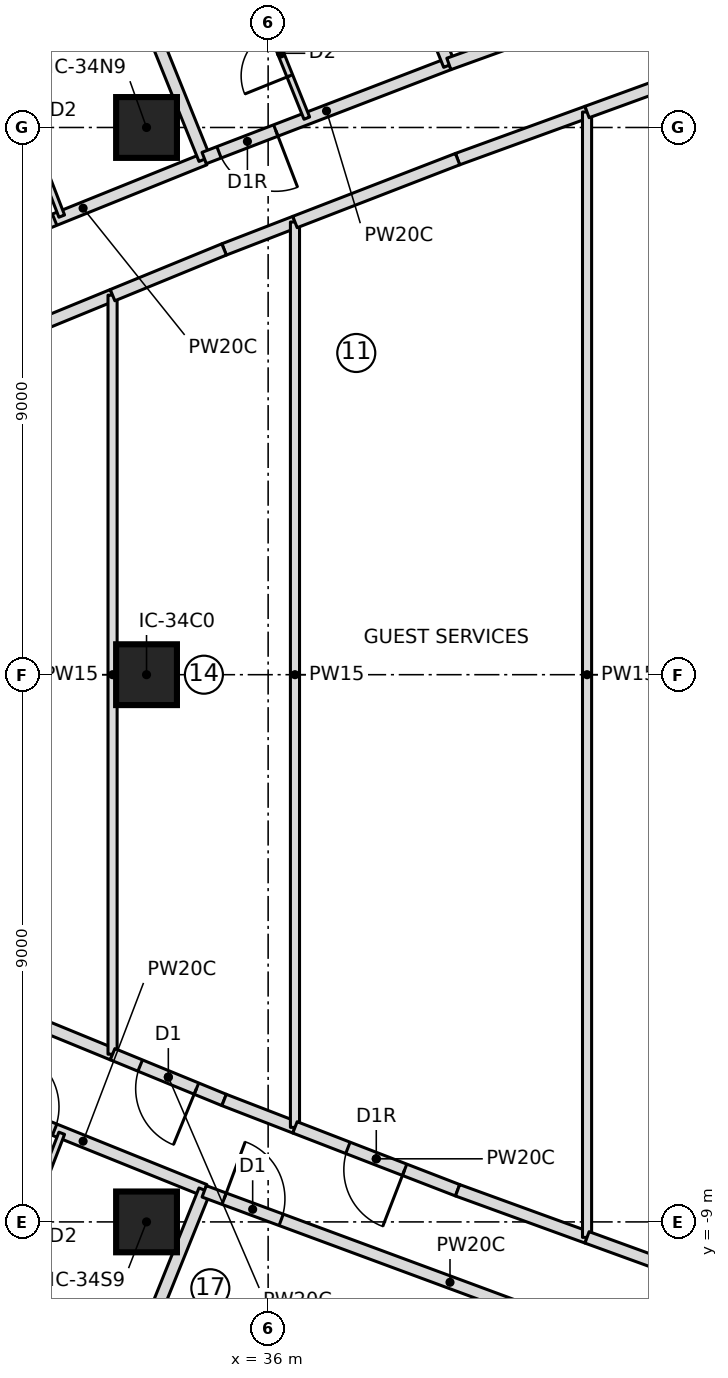
"""IFC4 building model, lengths in metres.
Left out: names, types, materials, properties, quantities, classifications, styles, units other than length and angle.
Written with IfcOpenShell. Run it as: python <this file> out.ifc"""

import sys

from ifc_helpers import new_model, si_unit, direction, frame, frame_2d, origin, origin_2d, place, context, subcontext, project, spatial, rectangle, extrude, element, fill, save


model = new_model("IFC4")
c1 = context("Model", 3, precision=1e-05, world=origin(), true_north=direction((0.0, 1.0)))
c2 = subcontext(c1, "Body", "Model", "MODEL_VIEW")
j1 = project(units=[si_unit("LENGTHUNIT", "METRE"), si_unit("PLANEANGLEUNIT", "RADIAN")], contexts=[c1])
p1 = place(None, origin())
s1 = spatial("IfcSite", under=j1, at=p1, CompositionType="ELEMENT")
p2 = place(p1, origin())
s2 = spatial("IfcBuilding", under=s1, at=p2, CompositionType="ELEMENT")
p3 = place(p2, frame((0.0, 0.0, 203.9)))
s3 = spatial("IfcBuildingStorey", under=s2, at=p3, CompositionType="ELEMENT", Elevation=203.9)
for number, where, z_axis, x_axis in (
    (1, (34.0, -9.0, 0.0), (0.0, 0.0, 1.0), (1.0, 0.0, 0.0)),
    (2, (34.0, 0.0, 0.0), (0.0, 0.0, 1.0), (1.0, 0.0, 0.0)),
    (3, (34.0, 9.0, 0.0), (0.0, 0.0, 1.0), (1.0, 0.0, 0.0)),
):
    element("IfcColumn", number, at=place(p3, frame(where, z_axis=z_axis, x_axis=x_axis)), inside=s3, PredefinedType="COLUMN", context=c2, shape_type="SweptSolid", body=[
        extrude(rectangle(XDim=1.0, YDim=1.0, at=origin_2d()), origin(), (0.0, 0.0, 1.0), 3.55),
    ])
p4 = place(p3, frame((30.958, 6.866, 0.0), z_axis=(0.0, 0.0, 1.0), x_axis=(0.927398695046, 0.374074404933, 0.0)))
e4 = element("IfcWall", 4, at=p4, inside=s3, PredefinedType="PARTITIONING", context=c2, shape_type="SweptSolid", body=[
    extrude(rectangle(XDim=4.311, YDim=0.2, at=frame_2d((2.155, 0.0))), origin(), (0.0, 0.0, 1.0), 3.25),
])
p5 = place(p4, frame((0.65, 0.0, 0.0)))
e5 = element("IfcOpeningElement", 5, at=p5, cuts=e4, PredefinedType="OPENING", context=c2, shape_type="SweptSolid", body=[
    extrude(rectangle(XDim=1.0, YDim=2.1, at=frame_2d((0.5, 1.05))), frame((0.0, 0.11, 0.0), z_axis=(0.0, -1.0, 0.0), x_axis=(1.0, 0.0, 0.0)), (0.0, 0.0, 1.0), 0.22),
])
p6 = place(p3, frame((32.605, 7.542, 0.0), z_axis=(0.0, 0.0, 1.0), x_axis=(-0.359637744424, 0.933092006603, 0.0)))
e6 = element("IfcWall", 6, at=p6, inside=s3, PredefinedType="PARTITIONING", context=c2, shape_type="SweptSolid", body=[
    extrude(rectangle(XDim=2.98, YDim=0.1, at=frame_2d((1.49, 0.0))), origin(), (0.0, 0.0, 1.0), 3.25),
])
p7 = place(p6, frame((1.45, 0.0, 0.0)))
e7 = element("IfcOpeningElement", 7, at=p7, cuts=e6, PredefinedType="OPENING", context=c2, shape_type="SweptSolid", body=[
    extrude(rectangle(XDim=0.8, YDim=2.1, at=frame_2d((0.4, 1.05))), frame((0.0, 0.06, 0.0), z_axis=(0.0, -1.0, 0.0), x_axis=(1.0, 0.0, 0.0)), (0.0, 0.0, 1.0), 0.12),
])
p8 = place(p3, frame((34.956, 8.479, 0.0), z_axis=(0.0, 0.0, 1.0), x_axis=(-0.373881438439, 0.927476506436, 0.0)))
e8 = element("IfcWall", 8, at=p8, inside=s3, PredefinedType="PARTITIONING", context=c2, shape_type="SweptSolid", body=[
    extrude(rectangle(XDim=7.601, YDim=0.2, at=frame_2d((3.8, 0.0))), origin(), (0.0, 0.0, 1.0), 3.25),
])
p9 = place(p3, frame((38.972, 10.045, 0.0), z_axis=(0.0, 0.0, 1.0), x_axis=(-0.93335728106, -0.358948723208, 0.0)))
e9 = element("IfcWall", 9, at=p9, inside=s3, PredefinedType="PARTITIONING", context=c2, shape_type="SweptSolid", body=[
    extrude(rectangle(XDim=4.312, YDim=0.2, at=frame_2d((2.156, 0.0))), origin(), (0.0, 0.0, 1.0), 3.25),
])
p10 = place(p9, frame((3.05, 0.0, 0.0)))
e10 = element("IfcOpeningElement", 10, at=p10, cuts=e9, PredefinedType="OPENING", context=c2, shape_type="SweptSolid", body=[
    extrude(rectangle(XDim=1.0, YDim=2.1, at=frame_2d((0.5, 1.05))), frame((0.0, 0.11, 0.0), z_axis=(0.0, -1.0, 0.0), x_axis=(1.0, 0.0, 0.0)), (0.0, 0.0, 1.0), 0.22),
])
p11 = place(p3, frame((36.636, 9.154, 0.0), z_axis=(0.0, 0.0, 1.0), x_axis=(-0.373885031976, 0.927475057813, 0.0)))
e11 = element("IfcWall", 11, at=p11, inside=s3, PredefinedType="PARTITIONING", context=c2, shape_type="SweptSolid", body=[
    extrude(rectangle(XDim=2.277, YDim=0.1, at=frame_2d((1.138, 0.0))), origin(), (0.0, 0.0, 1.0), 3.25),
])
p12 = place(p11, frame((0.75, 0.0, 0.0)))
e12 = element("IfcOpeningElement", 12, at=p12, cuts=e11, PredefinedType="OPENING", context=c2, shape_type="SweptSolid", body=[
    extrude(rectangle(XDim=0.8, YDim=2.1, at=frame_2d((0.4, 1.05))), frame((0.0, 0.06, 0.0), z_axis=(0.0, -1.0, 0.0), x_axis=(1.0, 0.0, 0.0)), (0.0, 0.0, 1.0), 0.12),
])
p13 = place(p3, frame((38.98, 10.026, 0.0), z_axis=(0.0, 0.0, 1.0), x_axis=(-0.373863662938, 0.927483671843, 0.0)))
e13 = element("IfcWall", 13, at=p13, inside=s3, PredefinedType="PARTITIONING", context=c2, shape_type="SweptSolid", body=[
    extrude(rectangle(XDim=7.604, YDim=0.2, at=frame_2d((3.802, 0.0))), origin(), (0.0, 0.0, 1.0), 3.25),
])
p14 = place(p3, frame((43.026, 11.507, 0.0), z_axis=(0.0, 0.0, 1.0), x_axis=(-0.940653905433, -0.339367397069, 0.0)))
e14 = element("IfcWall", 14, at=p14, inside=s3, PredefinedType="PARTITIONING", context=c2, shape_type="SweptSolid", body=[
    extrude(rectangle(XDim=4.309, YDim=0.2, at=frame_2d((2.155, 0.0))), origin(), (0.0, 0.0, 1.0), 3.25),
])
p15 = place(p14, frame((0.4, 0.0, 0.0)))
e15 = element("IfcOpeningElement", 15, at=p15, cuts=e14, PredefinedType="OPENING", context=c2, shape_type="SweptSolid", body=[
    extrude(rectangle(XDim=1.0, YDim=2.1, at=frame_2d((0.5, 1.05))), frame((0.0, 0.11, 0.0), z_axis=(0.0, -1.0, 0.0), x_axis=(1.0, 0.0, 0.0)), (0.0, 0.0, 1.0), 0.22),
])
p16 = place(p3, frame((30.958, -6.866, 0.0), z_axis=(0.0, 0.0, 1.0), x_axis=(0.927398695046, -0.374074404933, 0.0)))
e16 = element("IfcWall", 16, at=p16, inside=s3, PredefinedType="PARTITIONING", context=c2, shape_type="SweptSolid", body=[
    extrude(rectangle(XDim=4.311, YDim=0.2, at=frame_2d((2.155, 0.0))), origin(), (0.0, 0.0, 1.0), 3.25),
])
p17 = place(p16, frame((0.65, 0.0, 0.0)))
e17 = element("IfcOpeningElement", 17, at=p17, cuts=e16, PredefinedType="OPENING", context=c2, shape_type="SweptSolid", body=[
    extrude(rectangle(XDim=1.0, YDim=2.1, at=frame_2d((0.5, 1.05))), frame((0.0, 0.11, 0.0), z_axis=(0.0, -1.0, 0.0), x_axis=(1.0, 0.0, 0.0)), (0.0, 0.0, 1.0), 0.22),
])
p18 = place(p3, frame((31.534, -10.323, 0.0), z_axis=(0.0, 0.0, 1.0), x_axis=(0.359610255373, 0.933102601127, 0.0)))
e18 = element("IfcWall", 18, at=p18, inside=s3, PredefinedType="PARTITIONING", context=c2, shape_type="SweptSolid", body=[
    extrude(rectangle(XDim=2.98, YDim=0.1, at=frame_2d((1.49, 0.0))), origin(), (0.0, 0.0, 1.0), 3.25),
])
p19 = place(p18, frame((0.75, 0.0, 0.0)))
e19 = element("IfcOpeningElement", 19, at=p19, cuts=e18, PredefinedType="OPENING", context=c2, shape_type="SweptSolid", body=[
    extrude(rectangle(XDim=0.8, YDim=2.1, at=frame_2d((0.4, 1.05))), frame((0.0, 0.06, 0.0), z_axis=(0.0, -1.0, 0.0), x_axis=(1.0, 0.0, 0.0)), (0.0, 0.0, 1.0), 0.12),
])
p20 = place(p3, frame((32.114, -15.528, 0.0), z_axis=(0.0, 0.0, 1.0), x_axis=(0.373881438439, 0.927476506436, 0.0)))
e20 = element("IfcWall", 20, at=p20, inside=s3, PredefinedType="PARTITIONING", context=c2, shape_type="SweptSolid", body=[
    extrude(rectangle(XDim=7.601, YDim=0.2, at=frame_2d((3.8, 0.0))), origin(), (0.0, 0.0, 1.0), 3.25),
])
p21 = place(p3, frame((34.948, -8.497, 0.0), z_axis=(0.0, 0.0, 1.0), x_axis=(0.937864515454, -0.347001657996, 0.0)))
e21 = element("IfcWall", 21, at=p21, inside=s3, PredefinedType="PARTITIONING", context=c2, shape_type="SweptSolid", body=[
    extrude(rectangle(XDim=8.621, YDim=0.2, at=frame_2d((4.311, 0.0))), origin(), (0.0, 0.0, 1.0), 3.25),
])
p22 = place(p21, frame((0.35, 0.0, 0.0)))
e22 = element("IfcOpeningElement", 22, at=p22, cuts=e21, PredefinedType="OPENING", context=c2, shape_type="SweptSolid", body=[
    extrude(rectangle(XDim=1.0, YDim=2.1, at=frame_2d((0.5, 1.05))), frame((0.0, 0.11, 0.0), z_axis=(0.0, -1.0, 0.0), x_axis=(1.0, 0.0, 0.0)), (0.0, 0.0, 1.0), 0.22),
])
for number, where, z_axis, x_axis in (
    (23, (33.441, -6.242, 0.0), (0.0, 0.0, 1.0), (-0.925, 0.379, 0.0)),
    (24, (31.467, 5.432, 0.0), (0.0, 0.0, 1.0), (0.925, 0.379, 0.0)),
):
    element("IfcWall", number, at=place(p3, frame(where, z_axis=z_axis, x_axis=x_axis)), inside=s3, PredefinedType="PARTITIONING", context=c2, shape_type="SweptSolid", body=[
        extrude(rectangle(XDim=2.135, YDim=0.2, at=frame_2d((1.067, 0.0))), origin(), (0.0, 0.0, 1.0), 3.25),
    ])
p23 = place(p3, frame((33.441, -6.242, 0.0), z_axis=(0.0, 0.0, 1.0), x_axis=(0.0, 1.0, 0.0)))
e25 = element("IfcWall", 25, at=p23, inside=s3, PredefinedType="PARTITIONING", context=c2, shape_type="SweptSolid", body=[
    extrude(rectangle(XDim=12.484, YDim=0.15, at=frame_2d((6.242, 0.0))), origin(), (0.0, 0.0, 1.0), 3.25),
])
p24 = place(p3, frame((35.276, -6.994, 0.0), z_axis=(0.0, 0.0, 1.0), x_axis=(-0.925179705777, 0.379529329589, 0.0)))
e26 = element("IfcWall", 26, at=p24, inside=s3, PredefinedType="PARTITIONING", context=c2, shape_type="SweptSolid", body=[
    extrude(rectangle(XDim=1.983, YDim=0.2, at=frame_2d((0.991, 0.0))), origin(), (0.0, 0.0, 1.0), 3.25),
])
p25 = place(p24, frame((0.491, 0.0, 0.0)))
e27 = element("IfcOpeningElement", 27, at=p25, cuts=e26, PredefinedType="OPENING", context=c2, shape_type="SweptSolid", body=[
    extrude(rectangle(XDim=1.0, YDim=2.1, at=frame_2d((0.5, 1.05))), frame((0.0, 0.11, 0.0), z_axis=(0.0, -1.0, 0.0), x_axis=(1.0, 0.0, 0.0)), (0.0, 0.0, 1.0), 0.22),
])
for number, where, z_axis, x_axis in (
    (28, (35.276, 6.994, 0.0), (0.0, 0.0, 1.0), (0.933, 0.361, 0.0)),
    (29, (36.441, -7.445, 0.0), (0.0, 0.0, 1.0), (-0.933, 0.361, 0.0)),
):
    element("IfcWall", number, at=place(p3, frame(where, z_axis=z_axis, x_axis=x_axis)), inside=s3, PredefinedType="PARTITIONING", context=c2, shape_type="SweptSolid", body=[
        extrude(rectangle(XDim=1.25, YDim=0.2, at=frame_2d((0.625, 0.0))), origin(), (0.0, 0.0, 1.0), 3.25),
    ])
p26 = place(p3, frame((33.441, 6.242, 0.0), z_axis=(0.0, 0.0, 1.0), x_axis=(0.925179705777, 0.379529329589, 0.0)))
e30 = element("IfcWall", 30, at=p26, inside=s3, PredefinedType="PARTITIONING", context=c2, shape_type="SweptSolid", body=[
    extrude(rectangle(XDim=1.983, YDim=0.2, at=frame_2d((0.991, 0.0))), origin(), (0.0, 0.0, 1.0), 3.25),
])
p27 = place(p3, frame((36.441, -7.445, 0.0), z_axis=(0.0, 0.0, 1.0), x_axis=(0.0, 1.0, 0.0)))
e31 = element("IfcWall", 31, at=p27, inside=s3, PredefinedType="PARTITIONING", context=c2, shape_type="SweptSolid", body=[
    extrude(rectangle(XDim=14.89, YDim=0.15, at=frame_2d((7.445, 0.0))), origin(), (0.0, 0.0, 1.0), 3.25),
])
p28 = place(p3, frame((39.115, -8.479, 0.0), z_axis=(0.0, 0.0, 1.0), x_axis=(-0.932650373077, 0.36078148733, 0.0)))
e32 = element("IfcWall", 32, at=p28, inside=s3, PredefinedType="PARTITIONING", context=c2, shape_type="SweptSolid", body=[
    extrude(rectangle(XDim=2.867, YDim=0.2, at=frame_2d((1.434, 0.0))), origin(), (0.0, 0.0, 1.0), 3.25),
])
p29 = place(p28, frame((0.934, 0.0, 0.0)))
e33 = element("IfcOpeningElement", 33, at=p29, cuts=e32, PredefinedType="OPENING", context=c2, shape_type="SweptSolid", body=[
    extrude(rectangle(XDim=1.0, YDim=2.1, at=frame_2d((0.5, 1.05))), frame((0.0, 0.11, 0.0), z_axis=(0.0, -1.0, 0.0), x_axis=(1.0, 0.0, 0.0)), (0.0, 0.0, 1.0), 0.22),
])
for number, where, z_axis, x_axis in (
    (34, (39.115, 8.479, 0.0), (0.0, 0.0, 1.0), (0.94, 0.342, 0.0)),
    (35, (41.245, -9.254, 0.0), (0.0, 0.0, 1.0), (-0.94, 0.342, 0.0)),
):
    element("IfcWall", number, at=place(p3, frame(where, z_axis=z_axis, x_axis=x_axis)), inside=s3, PredefinedType="PARTITIONING", context=c2, shape_type="SweptSolid", body=[
        extrude(rectangle(XDim=2.266, YDim=0.2, at=frame_2d((1.133, 0.0))), origin(), (0.0, 0.0, 1.0), 3.25),
    ])
p30 = place(p3, frame((36.441, 7.445, 0.0), z_axis=(0.0, 0.0, 1.0), x_axis=(0.932650373077, 0.36078148733, 0.0)))
e36 = element("IfcWall", 36, at=p30, inside=s3, PredefinedType="PARTITIONING", context=c2, shape_type="SweptSolid", body=[
    extrude(rectangle(XDim=2.867, YDim=0.2, at=frame_2d((1.434, 0.0))), origin(), (0.0, 0.0, 1.0), 3.25),
])
p31 = place(p3, frame((41.245, -9.254, 0.0), z_axis=(0.0, 0.0, 1.0), x_axis=(0.0, 1.0, 0.0)))
e37 = element("IfcWall", 37, at=p31, inside=s3, PredefinedType="PARTITIONING", context=c2, shape_type="SweptSolid", body=[
    extrude(rectangle(XDim=18.508, YDim=0.15, at=frame_2d((9.254, 0.0))), origin(), (0.0, 0.0, 1.0), 3.25),
])
for number, where, z_axis, x_axis in (
    (38, (42.984, -9.887, 0.0), (0.0, 0.0, 1.0), (-0.94, 0.342, 0.0)),
    (39, (41.245, 9.254, 0.0), (0.0, 0.0, 1.0), (0.94, 0.342, 0.0)),
):
    element("IfcWall", number, at=place(p3, frame(where, z_axis=z_axis, x_axis=x_axis)), inside=s3, PredefinedType="PARTITIONING", context=c2, shape_type="SweptSolid", body=[
        extrude(rectangle(XDim=1.851, YDim=0.2, at=frame_2d((0.926, 0.0))), origin(), (0.0, 0.0, 1.0), 3.25),
    ])
p32 = place(p5, origin())
e40 = element("IfcDoor", 40, at=p32, inside=s3, OperationType="SINGLE_SWING_RIGHT", PredefinedType="DOOR", context=c2, shape_type="SweptSolid", body=[
    extrude(rectangle(XDim=1.0, YDim=2.1, at=frame_2d((0.5, 1.05))), frame((0.0, 0.025, 0.0), z_axis=(0.0, -1.0, 0.0), x_axis=(1.0, 0.0, 0.0)), (0.0, 0.0, 1.0), 0.05),
])
fill(e5, e40)
p33 = place(p12, origin())
e41 = element("IfcDoor", 41, at=p33, inside=s3, OperationType="SINGLE_SWING_LEFT", PredefinedType="DOOR", context=c2, shape_type="SweptSolid", body=[
    extrude(rectangle(XDim=0.8, YDim=2.1, at=frame_2d((0.4, 1.05))), frame((0.0, 0.025, 0.0), z_axis=(0.0, -1.0, 0.0), x_axis=(1.0, 0.0, 0.0)), (0.0, 0.0, 1.0), 0.05),
])
fill(e12, e41)
p34 = place(p10, origin())
e42 = element("IfcDoor", 42, at=p34, inside=s3, OperationType="SINGLE_SWING_RIGHT", PredefinedType="DOOR", context=c2, shape_type="SweptSolid", body=[
    extrude(rectangle(XDim=1.0, YDim=2.1, at=frame_2d((0.5, 1.05))), frame((0.0, 0.025, 0.0), z_axis=(0.0, -1.0, 0.0), x_axis=(1.0, 0.0, 0.0)), (0.0, 0.0, 1.0), 0.05),
])
fill(e10, e42)
p35 = place(p17, origin())
e43 = element("IfcDoor", 43, at=p35, inside=s3, OperationType="SINGLE_SWING_LEFT", PredefinedType="DOOR", context=c2, shape_type="SweptSolid", body=[
    extrude(rectangle(XDim=1.0, YDim=2.1, at=frame_2d((0.5, 1.05))), frame((0.0, 0.025, 0.0), z_axis=(0.0, -1.0, 0.0), x_axis=(1.0, 0.0, 0.0)), (0.0, 0.0, 1.0), 0.05),
])
fill(e17, e43)
p36 = place(p22, origin())
e44 = element("IfcDoor", 44, at=p36, inside=s3, OperationType="SINGLE_SWING_LEFT", PredefinedType="DOOR", context=c2, shape_type="SweptSolid", body=[
    extrude(rectangle(XDim=1.0, YDim=2.1, at=frame_2d((0.5, 1.05))), frame((0.0, 0.025, 0.0), z_axis=(0.0, -1.0, 0.0), x_axis=(1.0, 0.0, 0.0)), (0.0, 0.0, 1.0), 0.05),
])
fill(e22, e44)
p37 = place(p25, origin())
e45 = element("IfcDoor", 45, at=p37, inside=s3, OperationType="SINGLE_SWING_LEFT", PredefinedType="DOOR", context=c2, shape_type="SweptSolid", body=[
    extrude(rectangle(XDim=1.0, YDim=2.1, at=frame_2d((0.5, 1.05))), frame((0.0, 0.025, 0.0), z_axis=(0.0, -1.0, 0.0), x_axis=(1.0, 0.0, 0.0)), (0.0, 0.0, 1.0), 0.05),
])
fill(e27, e45)
p38 = place(p29, origin())
e46 = element("IfcDoor", 46, at=p38, inside=s3, OperationType="SINGLE_SWING_RIGHT", PredefinedType="DOOR", context=c2, shape_type="SweptSolid", body=[
    extrude(rectangle(XDim=1.0, YDim=2.1, at=frame_2d((0.5, 1.05))), frame((0.0, 0.025, 0.0), z_axis=(0.0, -1.0, 0.0), x_axis=(1.0, 0.0, 0.0)), (0.0, 0.0, 1.0), 0.05),
])
fill(e33, e46)
save(model, sys.argv[1])
